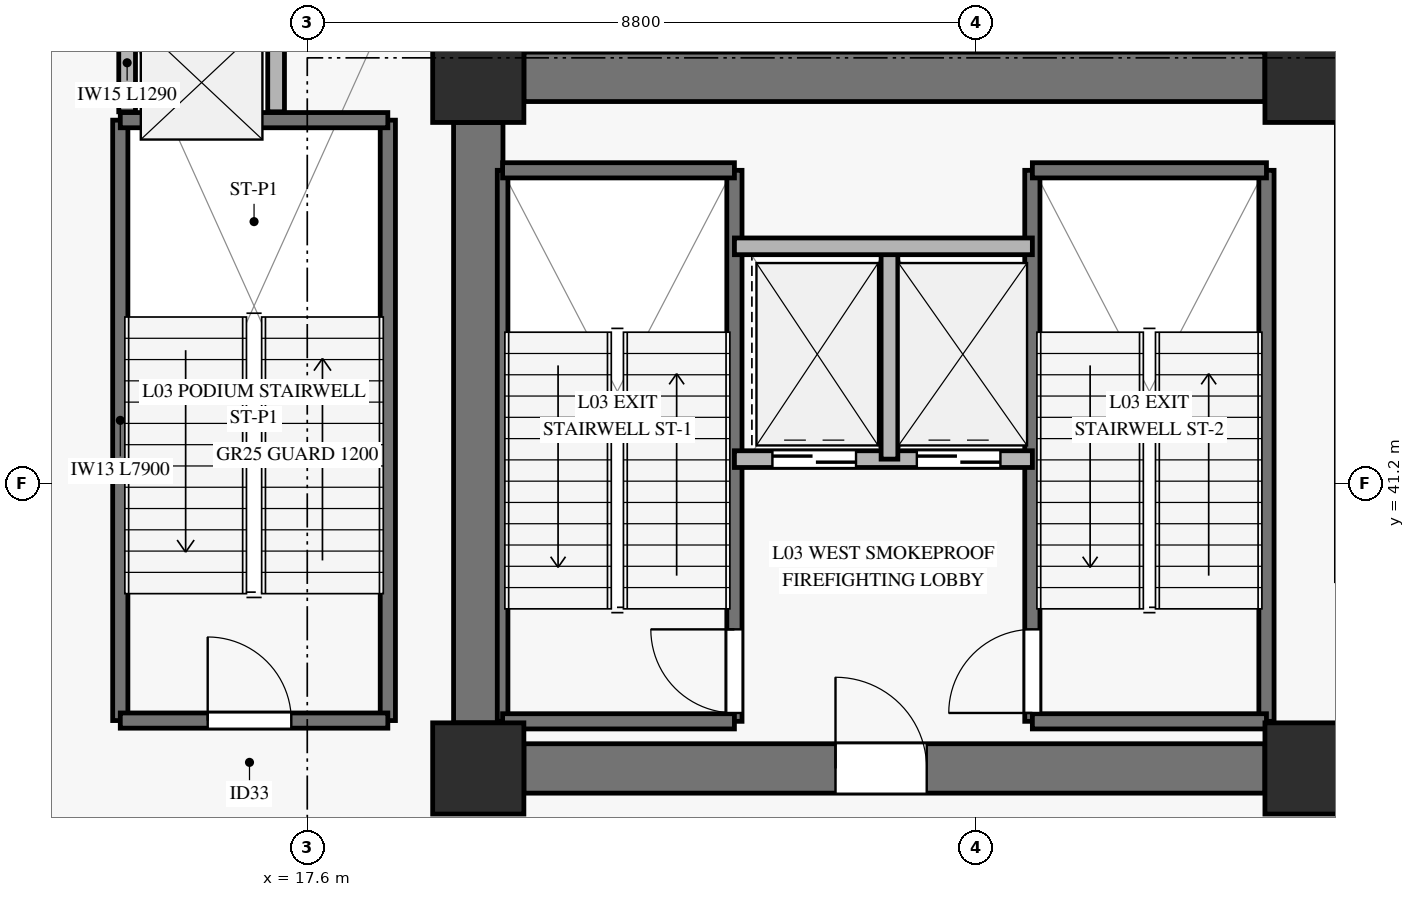
"""IFC4 building model, lengths in metres.
Left out: names, types, materials, properties, quantities, classifications, styles, units other than length and angle.
Written with IfcOpenShell. Run it as: python <this file> out.ifc"""

import sys

from ifc_helpers import new_model, si_unit, direction, frame, frame_2d, origin, origin_2d, place, context, subcontext, project, spatial, rectangle, extrude, source, transform, mapped, element, fill, save


model = new_model("IFC4")
c1 = context("Model", 3, precision=1e-05, world=origin(), true_north=direction((0.0, 1.0)))
c2 = subcontext(c1, "Body", "Model", "MODEL_VIEW")
j1 = project(units=[si_unit("LENGTHUNIT", "METRE"), si_unit("PLANEANGLEUNIT", "RADIAN")], contexts=[c1])
p1 = place(None, origin())
s1 = spatial("IfcSite", under=j1, at=p1, CompositionType="ELEMENT")
p2 = place(p1, origin())
s2 = spatial("IfcBuilding", under=s1, at=p2, CompositionType="ELEMENT")
p3 = place(p2, frame((0.0, 0.0, 10.4)))
s3 = spatial("IfcBuildingStorey", under=s2, at=p3, CompositionType="ELEMENT", Elevation=10.4)
m1 = source(origin(), c2, "Body", "SweptSolid", [
    extrude(rectangle(XDim=1.2, YDim=1.2, at=origin_2d()), origin(), (0.0, 0.0, 1.0), 4.54),
])
for number, where, z_axis, x_axis in (
    (1, (19.85, 37.45, 0.0), (0.0, 0.0, 1.0), (1.0, 0.0, 0.0)),
    (2, (19.85, 46.55, 0.0), (0.0, 0.0, 1.0), (1.0, 0.0, 0.0)),
    (3, (30.8, 37.45, 0.0), (0.0, 0.0, 1.0), (1.0, 0.0, 0.0)),
    (4, (30.8, 46.55, 0.0), (0.0, 0.0, 1.0), (1.0, 0.0, 0.0)),
):
    element("IfcColumn", number, at=place(p3, frame(where, z_axis=z_axis, x_axis=x_axis)), inside=s3, PredefinedType="PILASTER", context=c2, shape_type="MappedRepresentation", body=[
        mapped(m1, transform((0.0, 0.0, 0.0), x_axis=(1.0, 0.0, 0.0), y_axis=(0.0, 1.0, 0.0), z_axis=(0.0, 0.0, 1.0), scale=1.0)),
    ])
p4 = place(p3, frame((20.45, 46.55, 0.0), z_axis=(0.0, 0.0, 1.0), x_axis=(1.0, 0.0, 0.0)))
e5 = element("IfcWall", 5, at=p4, inside=s3, PredefinedType="SHEAR", context=c2, shape_type="SweptSolid", body=[
    extrude(rectangle(XDim=9.75, YDim=0.65, at=frame_2d((4.875, 0.0))), origin(), (0.0, 0.0, 1.0), 4.54),
])
p5 = place(p3, frame((20.45, 37.45, 0.0), z_axis=(0.0, 0.0, 1.0), x_axis=(1.0, 0.0, 0.0)))
e6 = element("IfcWall", 6, at=p5, inside=s3, PredefinedType="SHEAR", context=c2, shape_type="SweptSolid", body=[
    extrude(rectangle(XDim=9.75, YDim=0.65, at=frame_2d((4.875, 0.0))), origin(), (0.0, 0.0, 1.0), 4.54),
])
p6 = place(p5, frame((4.1, 0.0, 0.0)))
e7 = element("IfcOpeningElement", 7, at=p6, cuts=e6, PredefinedType="OPENING", context=c2, shape_type="SweptSolid", body=[
    extrude(rectangle(XDim=1.2, YDim=2.15, at=frame_2d((0.6, 1.075))), frame((0.0, 0.335, 0.0), z_axis=(0.0, -1.0, 0.0), x_axis=(1.0, 0.0, 0.0)), (0.0, 0.0, 1.0), 0.67),
])
p7 = place(p3, frame((19.85, 38.05, 0.0), z_axis=(0.0, 0.0, 1.0), x_axis=(0.0, 1.0, 0.0)))
e8 = element("IfcWall", 8, at=p7, inside=s3, PredefinedType="SHEAR", context=c2, shape_type="SweptSolid", body=[
    extrude(rectangle(XDim=7.9, YDim=0.65, at=frame_2d((3.95, 0.0))), origin(), (0.0, 0.0, 1.0), 4.54),
])
p8 = place(p3, frame((20.17, 38.07, 0.0), z_axis=(0.0, 0.0, 1.0), x_axis=(0.0, 1.0, 0.0)))
e9 = element("IfcWall", 9, at=p8, inside=s3, PredefinedType="SOLIDWALL", context=c2, shape_type="SweptSolid", body=[
    extrude(rectangle(XDim=7.25, YDim=0.14, at=frame_2d((3.625, 0.0))), origin(), (0.0, 0.0, 1.0), 4.8),
])
p9 = place(p3, frame((23.22, 38.07, 0.0), z_axis=(0.0, 0.0, 1.0), x_axis=(0.0, 1.0, 0.0)))
e10 = element("IfcWall", 10, at=p9, inside=s3, PredefinedType="SOLIDWALL", context=c2, shape_type="SweptSolid", body=[
    extrude(rectangle(XDim=7.25, YDim=0.2, at=frame_2d((3.625, 0.0))), origin(), (0.0, 0.0, 1.0), 4.8),
])
p10 = place(p9, frame((0.11, 0.0, 0.0)))
e11 = element("IfcOpeningElement", 11, at=p10, cuts=e10, PredefinedType="OPENING", context=c2, shape_type="SweptSolid", body=[
    extrude(rectangle(XDim=1.1, YDim=2.15, at=frame_2d((0.55, 1.075))), frame((0.0, 0.11, 0.0), z_axis=(0.0, -1.0, 0.0), x_axis=(1.0, 0.0, 0.0)), (0.0, 0.0, 1.0), 0.22),
])
for number, where, z_axis, x_axis in (
    (12, (20.17, 45.32, 0.0), (0.0, 0.0, 1.0), (1.0, 0.0, 0.0)),
    (13, (20.17, 38.07, 0.0), (0.0, 0.0, 1.0), (1.0, 0.0, 0.0)),
):
    element("IfcWall", number, at=place(p3, frame(where, z_axis=z_axis, x_axis=x_axis)), inside=s3, PredefinedType="SOLIDWALL", context=c2, shape_type="SweptSolid", body=[
        extrude(rectangle(XDim=3.05, YDim=0.2, at=frame_2d((1.525, 0.0))), origin(), (0.0, 0.0, 1.0), 4.8),
    ])
p11 = place(p3, frame((27.14, 38.07, 0.0), z_axis=(0.0, 0.0, 1.0), x_axis=(0.0, 1.0, 0.0)))
e14 = element("IfcWall", 14, at=p11, inside=s3, PredefinedType="SOLIDWALL", context=c2, shape_type="SweptSolid", body=[
    extrude(rectangle(XDim=7.25, YDim=0.2, at=frame_2d((3.625, 0.0))), origin(), (0.0, 0.0, 1.0), 4.8),
])
p12 = place(p11, frame((0.11, 0.0, 0.0)))
e15 = element("IfcOpeningElement", 15, at=p12, cuts=e14, PredefinedType="OPENING", context=c2, shape_type="SweptSolid", body=[
    extrude(rectangle(XDim=1.1, YDim=2.15, at=frame_2d((0.55, 1.075))), frame((0.0, 0.11, 0.0), z_axis=(0.0, -1.0, 0.0), x_axis=(1.0, 0.0, 0.0)), (0.0, 0.0, 1.0), 0.22),
])
p13 = place(p3, frame((30.22, 38.07, 0.0), z_axis=(0.0, 0.0, 1.0), x_axis=(0.0, 1.0, 0.0)))
e16 = element("IfcWall", 16, at=p13, inside=s3, PredefinedType="SOLIDWALL", context=c2, shape_type="SweptSolid", body=[
    extrude(rectangle(XDim=7.25, YDim=0.2, at=frame_2d((3.625, 0.0))), origin(), (0.0, 0.0, 1.0), 4.8),
])
for number, where, z_axis, x_axis in (
    (17, (27.14, 45.32, 0.0), (0.0, 0.0, 1.0), (1.0, 0.0, 0.0)),
    (18, (27.14, 38.07, 0.0), (0.0, 0.0, 1.0), (1.0, 0.0, 0.0)),
):
    element("IfcWall", number, at=place(p3, frame(where, z_axis=z_axis, x_axis=x_axis)), inside=s3, PredefinedType="SOLIDWALL", context=c2, shape_type="SweptSolid", body=[
        extrude(rectangle(XDim=3.08, YDim=0.2, at=frame_2d((1.54, 0.0))), origin(), (0.0, 0.0, 1.0), 4.8),
    ])
p14 = place(p3, frame((23.22, 41.52, 0.0), z_axis=(0.0, 0.0, 1.0), x_axis=(1.0, 0.0, 0.0)))
e19 = element("IfcWall", 19, at=p14, inside=s3, PredefinedType="SOLIDWALL", context=c2, shape_type="SweptSolid", body=[
    extrude(rectangle(XDim=3.92, YDim=0.22, at=frame_2d((1.96, 0.0))), origin(), (0.0, 0.0, 1.0), 4.54),
])
p15 = place(p14, frame((0.5, 0.0, 0.0)))
e20 = element("IfcOpeningElement", 20, at=p15, cuts=e19, PredefinedType="OPENING", context=c2, shape_type="SweptSolid", body=[
    extrude(rectangle(XDim=1.1, YDim=2.2, at=frame_2d((0.55, 1.1))), frame((0.0, 0.12, 0.0), z_axis=(0.0, -1.0, 0.0), x_axis=(1.0, 0.0, 0.0)), (0.0, 0.0, 1.0), 0.24),
])
p16 = place(p14, frame((2.4, 0.0, 0.0)))
e21 = element("IfcOpeningElement", 21, at=p16, cuts=e19, PredefinedType="OPENING", context=c2, shape_type="SweptSolid", body=[
    extrude(rectangle(XDim=1.1, YDim=2.2, at=frame_2d((0.55, 1.1))), frame((0.0, 0.12, 0.0), z_axis=(0.0, -1.0, 0.0), x_axis=(1.0, 0.0, 0.0)), (0.0, 0.0, 1.0), 0.24),
])
p17 = place(p3, frame((25.26, 41.52, 0.0), z_axis=(0.0, 0.0, 1.0), x_axis=(0.0, 1.0, 0.0)))
e22 = element("IfcWall", 22, at=p17, inside=s3, PredefinedType="SOLIDWALL", context=c2, shape_type="SweptSolid", body=[
    extrude(rectangle(XDim=2.8, YDim=0.22, at=frame_2d((1.4, 0.0))), origin(), (0.0, 0.0, 1.0), 4.54),
])
p18 = place(p3, frame((23.22, 44.32, 0.0), z_axis=(0.0, 0.0, 1.0), x_axis=(1.0, 0.0, 0.0)))
e23 = element("IfcWall", 23, at=p18, inside=s3, PredefinedType="SOLIDWALL", context=c2, shape_type="SweptSolid", body=[
    extrude(rectangle(XDim=3.92, YDim=0.22, at=frame_2d((1.96, 0.0))), origin(), (0.0, 0.0, 1.0), 4.54),
])
for number, where, z_axis, x_axis in (
    (24, (15.14, 38.08, 0.0), (0.0, 0.0, 1.0), (0.0, 1.0, 0.0)),
    (25, (18.66, 38.08, 0.0), (0.0, 0.0, 1.0), (0.0, 1.0, 0.0)),
):
    element("IfcWall", number, at=place(p3, frame(where, z_axis=z_axis, x_axis=x_axis)), inside=s3, PredefinedType="SOLIDWALL", context=c2, shape_type="SweptSolid", body=[
        extrude(rectangle(XDim=7.9, YDim=0.2, at=frame_2d((3.95, 0.0))), origin(), (0.0, 0.0, 1.0), 4.8),
    ])
p19 = place(p3, frame((15.14, 45.98, 0.0), z_axis=(0.0, 0.0, 1.0), x_axis=(1.0, 0.0, 0.0)))
e26 = element("IfcWall", 26, at=p19, inside=s3, PredefinedType="SOLIDWALL", context=c2, shape_type="SweptSolid", body=[
    extrude(rectangle(XDim=3.52, YDim=0.2, at=frame_2d((1.76, 0.0))), origin(), (0.0, 0.0, 1.0), 4.8),
])
p20 = place(p3, frame((15.14, 38.08, 0.0), z_axis=(0.0, 0.0, 1.0), x_axis=(1.0, 0.0, 0.0)))
e27 = element("IfcWall", 27, at=p20, inside=s3, PredefinedType="SOLIDWALL", context=c2, shape_type="SweptSolid", body=[
    extrude(rectangle(XDim=3.52, YDim=0.2, at=frame_2d((1.76, 0.0))), origin(), (0.0, 0.0, 1.0), 4.8),
])
p21 = place(p20, frame((1.15, 0.0, 0.0)))
e28 = element("IfcOpeningElement", 28, at=p21, cuts=e27, PredefinedType="OPENING", context=c2, shape_type="SweptSolid", body=[
    extrude(rectangle(XDim=1.1, YDim=2.15, at=frame_2d((0.55, 1.075))), frame((0.0, 0.11, 0.0), z_axis=(0.0, -1.0, 0.0), x_axis=(1.0, 0.0, 0.0)), (0.0, 0.0, 1.0), 0.22),
])
for number, where, z_axis, x_axis in (
    (29, (15.23, 46.09, 0.0), (0.0, 0.0, 1.0), (0.0, 1.0, 0.0)),
    (30, (17.19, 46.09, 0.0), (0.0, 0.0, 1.0), (0.0, 1.0, 0.0)),
):
    element("IfcWall", number, at=place(p3, frame(where, z_axis=z_axis, x_axis=x_axis)), inside=s3, PredefinedType="SOLIDWALL", context=c2, shape_type="SweptSolid", body=[
        extrude(rectangle(XDim=1.29, YDim=0.22, at=frame_2d((0.645, 0.0))), origin(), (0.0, 0.0, 1.0), 4.54),
    ])
m2 = source(origin(), c2, "Body", "SweptSolid", [
    extrude(rectangle(XDim=1.1, YDim=2.15, at=frame_2d((0.55, 1.075))), frame((0.0, 0.025, 0.0), z_axis=(0.0, -1.0, 0.0), x_axis=(1.0, 0.0, 0.0)), (0.0, 0.0, 1.0), 0.05),
])
p22 = place(p10, origin())
e31 = element("IfcDoor", 31, at=p22, inside=s3, OperationType="SINGLE_SWING_RIGHT", PredefinedType="DOOR", context=c2, shape_type="MappedRepresentation", body=[
    mapped(m2, transform((0.0, 0.0, 0.0), x_axis=(1.0, 0.0, 0.0), y_axis=(0.0, 1.0, 0.0), z_axis=(0.0, 0.0, 1.0), scale=1.0)),
])
fill(e11, e31)
p23 = place(p12, origin())
e32 = element("IfcDoor", 32, at=p23, inside=s3, OperationType="SINGLE_SWING_LEFT", PredefinedType="DOOR", context=c2, shape_type="MappedRepresentation", body=[
    mapped(m2, transform((0.0, 0.0, 0.0), x_axis=(1.0, 0.0, 0.0), y_axis=(0.0, 1.0, 0.0), z_axis=(0.0, 0.0, 1.0), scale=1.0)),
])
fill(e15, e32)
m3 = source(origin(), c2, "Body", "SweptSolid", [
    extrude(rectangle(XDim=1.1, YDim=2.2, at=frame_2d((0.55, 1.1))), frame((0.0, 0.025, 0.0), z_axis=(0.0, -1.0, 0.0), x_axis=(1.0, 0.0, 0.0)), (0.0, 0.0, 1.0), 0.05),
])
p24 = place(p15, origin())
e33 = element("IfcDoor", 33, at=p24, inside=s3, OperationType="SLIDING_TO_LEFT", PredefinedType="DOOR", context=c2, shape_type="MappedRepresentation", body=[
    mapped(m3, transform((0.0, 0.0, 0.0), x_axis=(1.0, 0.0, 0.0), y_axis=(0.0, 1.0, 0.0), z_axis=(0.0, 0.0, 1.0), scale=1.0)),
])
fill(e20, e33)
p25 = place(p16, origin())
e34 = element("IfcDoor", 34, at=p25, inside=s3, OperationType="SLIDING_TO_LEFT", PredefinedType="DOOR", context=c2, shape_type="MappedRepresentation", body=[
    mapped(m3, transform((0.0, 0.0, 0.0), x_axis=(1.0, 0.0, 0.0), y_axis=(0.0, 1.0, 0.0), z_axis=(0.0, 0.0, 1.0), scale=1.0)),
])
fill(e21, e34)
m4 = source(origin(), c2, "Body", "SweptSolid", [
    extrude(rectangle(XDim=1.2, YDim=2.15, at=frame_2d((0.6, 1.075))), frame((0.0, 0.025, 0.0), z_axis=(0.0, -1.0, 0.0), x_axis=(1.0, 0.0, 0.0)), (0.0, 0.0, 1.0), 0.05),
])
p26 = place(p6, origin())
e35 = element("IfcDoor", 35, at=p26, inside=s3, OperationType="SINGLE_SWING_LEFT", PredefinedType="DOOR", context=c2, shape_type="MappedRepresentation", body=[
    mapped(m4, transform((0.0, 0.0, 0.0), x_axis=(1.0, 0.0, 0.0), y_axis=(0.0, 1.0, 0.0), z_axis=(0.0, 0.0, 1.0), scale=1.0)),
])
fill(e7, e35)
p27 = place(p21, origin())
e36 = element("IfcDoor", 36, at=p27, inside=s3, OperationType="SINGLE_SWING_LEFT", PredefinedType="DOOR", context=c2, shape_type="MappedRepresentation", body=[
    mapped(m2, transform((0.0, 0.0, 0.0), x_axis=(1.0, 0.0, 0.0), y_axis=(0.0, 1.0, 0.0), z_axis=(0.0, 0.0, 1.0), scale=1.0)),
])
fill(e28, e36)
save(model, sys.argv[1])
